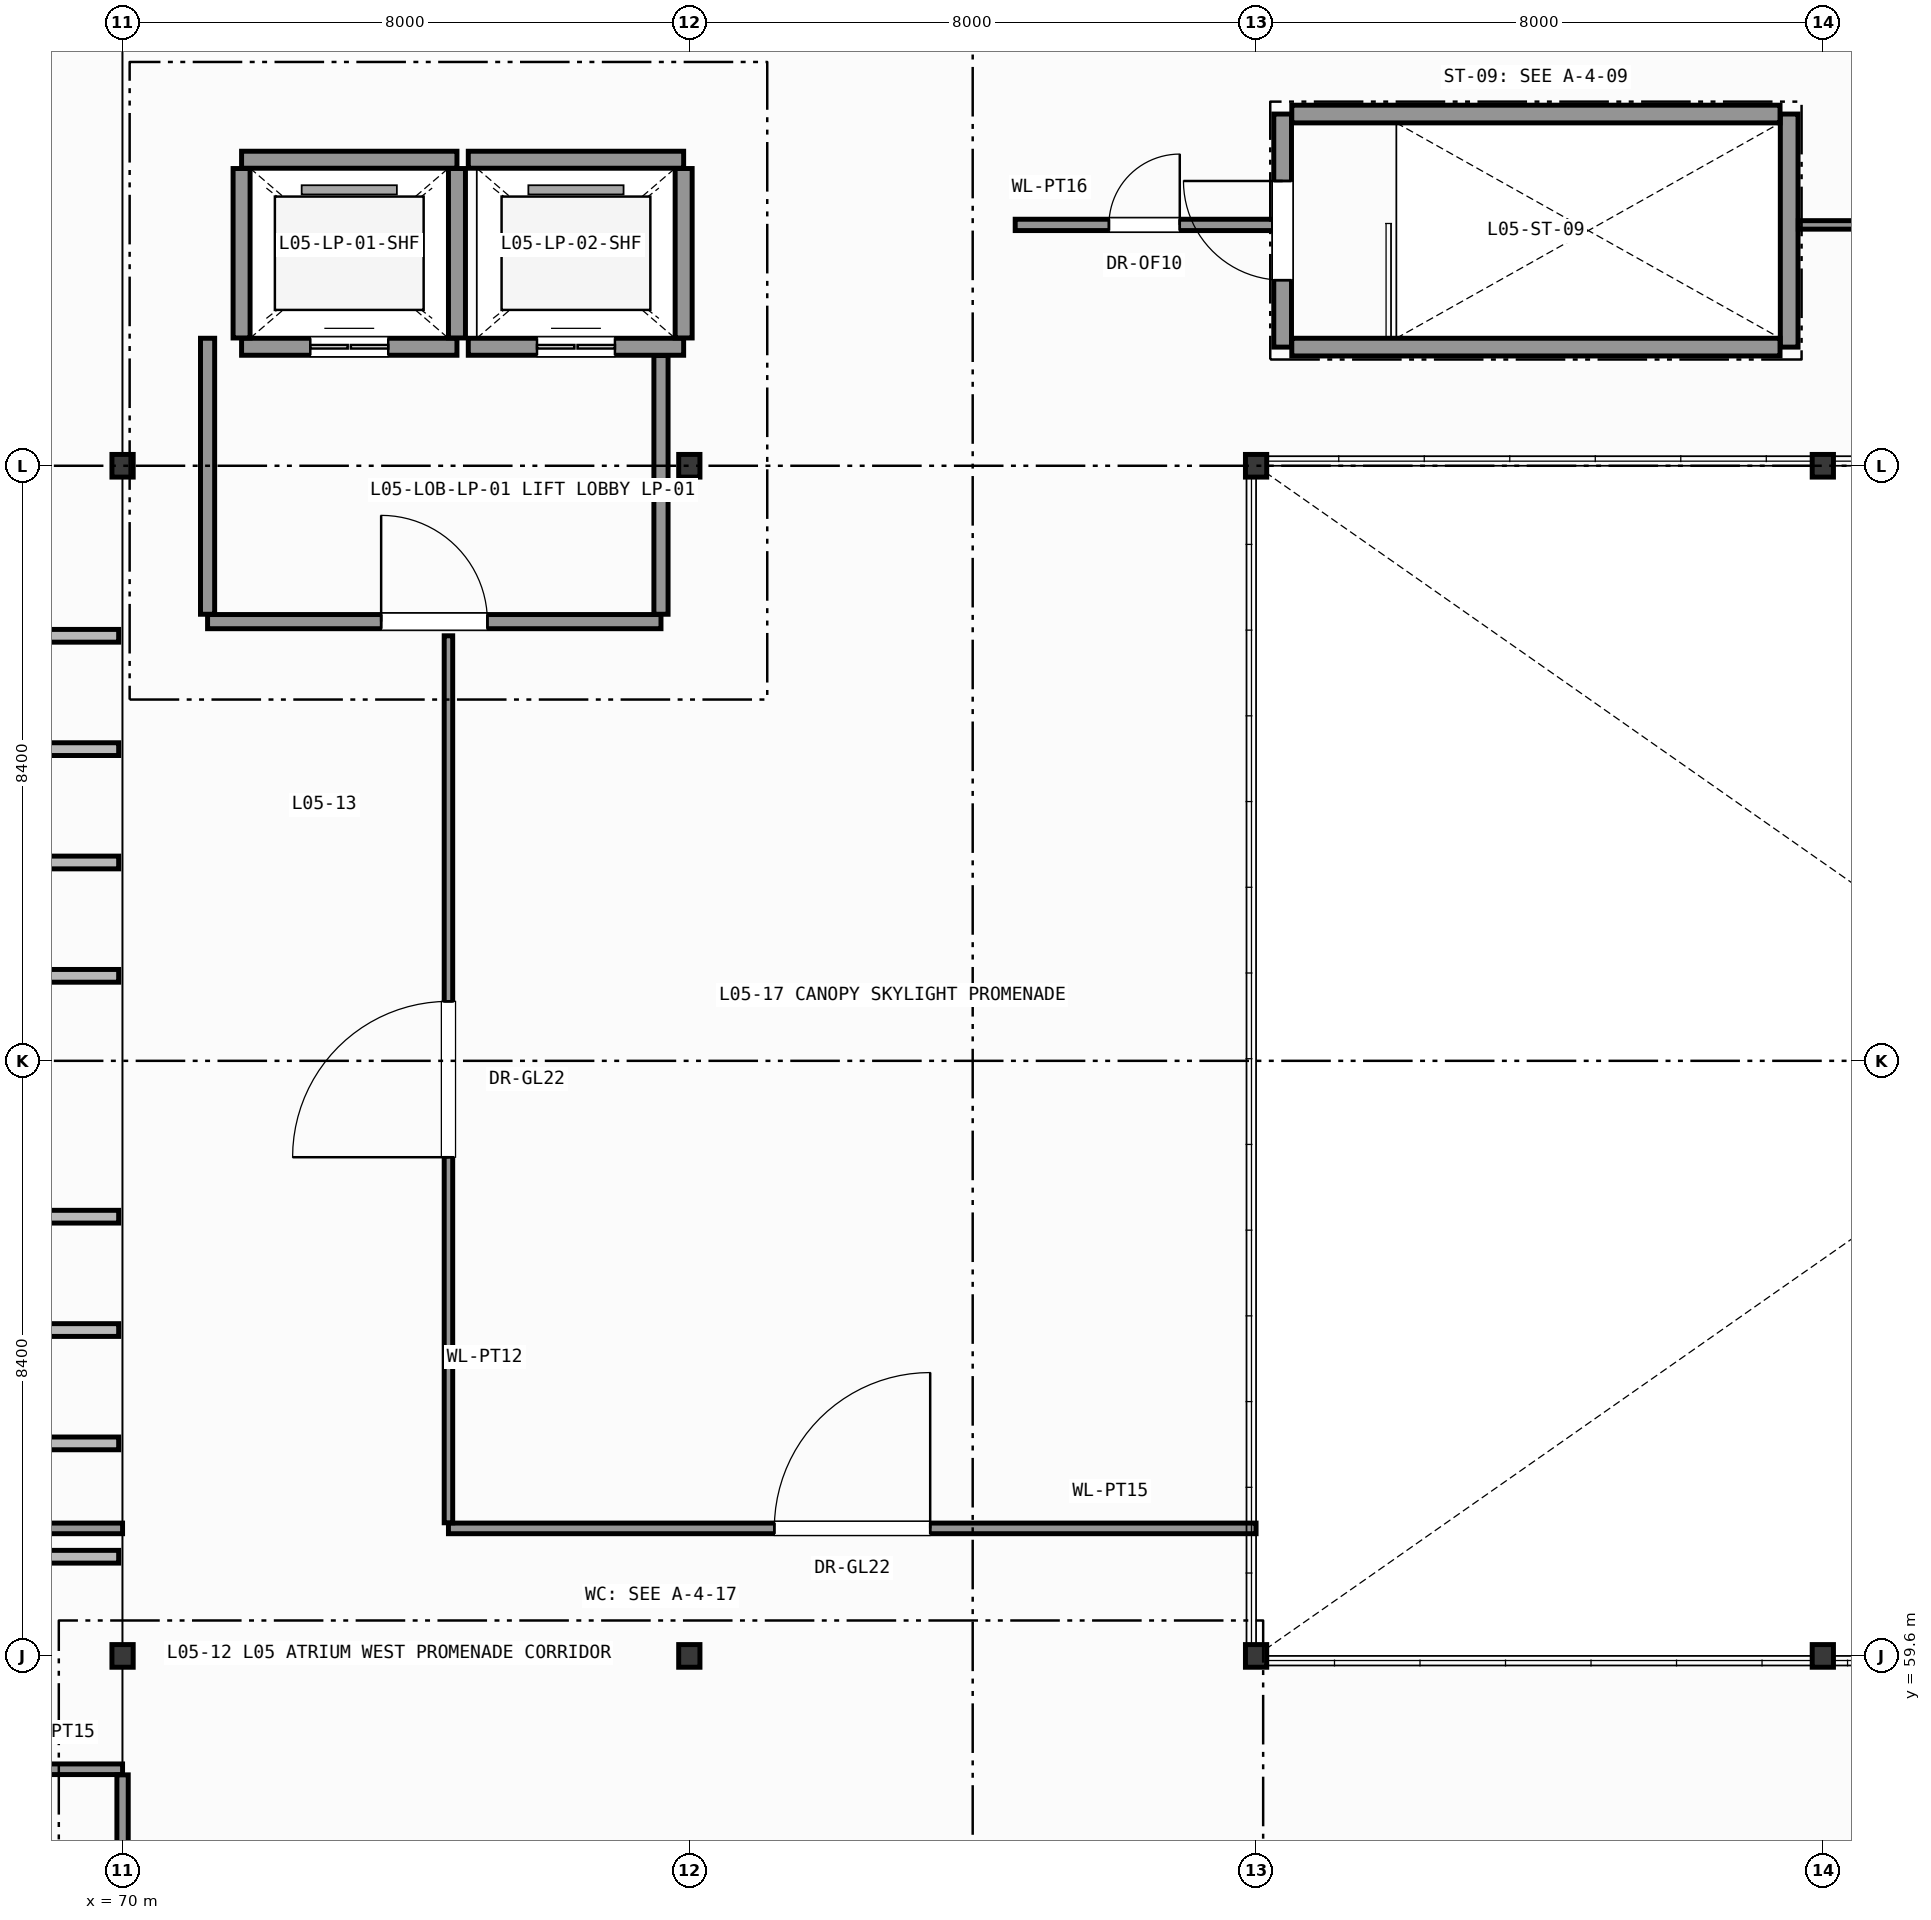
"""IFC4 building model, lengths in metres.
Left out: names, types, materials, properties, quantities, classifications, styles, units other than length and angle.
Written with IfcOpenShell. Run it as: python <this file> out.ifc"""

import sys

from ifc_helpers import new_model, si_unit, direction, frame, frame_2d, origin, origin_2d, place, context, subcontext, project, spatial, rectangle, i_section, extrude, element, fill, save


model = new_model("IFC4")
c1 = context("Model", 3, precision=1e-05, world=origin(), true_north=direction((0.0, 1.0)))
c2 = subcontext(c1, "Body", "Model", "MODEL_VIEW")
j1 = project(units=[si_unit("LENGTHUNIT", "METRE"), si_unit("PLANEANGLEUNIT", "RADIAN")], contexts=[c1])
p1 = place(None, origin())
s1 = spatial("IfcSite", under=j1, at=p1, CompositionType="ELEMENT")
p2 = place(p1, origin())
s2 = spatial("IfcBuilding", under=s1, at=p2, CompositionType="ELEMENT")
p3 = place(p2, frame((0.0, 0.0, 22.2)))
s3 = spatial("IfcBuildingStorey", under=s2, at=p3, CompositionType="ELEMENT", Elevation=22.2)
for number, where, z_axis, x_axis in (
    (1, (70.0, 59.6, 0.0), (0.0, 0.0, 1.0), (1.0, 0.0, 0.0)),
    (2, (70.0, 76.4, 0.0), (0.0, 0.0, 1.0), (1.0, 0.0, 0.0)),
    (3, (78.0, 59.6, 0.0), (0.0, 0.0, 1.0), (1.0, 0.0, 0.0)),
    (4, (78.0, 76.4, 0.0), (0.0, 0.0, 1.0), (1.0, 0.0, 0.0)),
    (5, (86.0, 59.6, 0.0), (0.0, 0.0, 1.0), (1.0, 0.0, 0.0)),
    (6, (86.0, 76.4, 0.0), (0.0, 0.0, 1.0), (1.0, 0.0, 0.0)),
    (7, (94.0, 59.6, 0.0), (0.0, 0.0, 1.0), (1.0, 0.0, 0.0)),
    (8, (94.0, 76.4, 0.0), (0.0, 0.0, 1.0), (1.0, 0.0, 0.0)),
):
    element("IfcColumn", number, at=place(p3, frame(where, z_axis=z_axis, x_axis=x_axis)), inside=s3, PredefinedType="COLUMN", context=c2, shape_type="SweptSolid", body=[
        extrude(i_section(OverallWidth=0.3, OverallDepth=0.32, WebThickness=0.011, FlangeThickness=0.021, FilletRadius=0.027, at=origin_2d()), origin(), (0.0, 0.0, 1.0), 4.2),
    ])
p4 = place(p3, frame((86.375, 78.075, 0.0), z_axis=(0.0, 0.0, 1.0), x_axis=(0.0, 1.0, 0.0)))
e9 = element("IfcWall", 9, at=p4, inside=s3, PredefinedType="SHEAR", context=c2, shape_type="SweptSolid", body=[
    extrude(rectangle(XDim=3.29, YDim=0.25, at=frame_2d((1.645, 0.0))), origin(), (0.0, 0.0, 1.0), 3.98),
])
p5 = place(p4, frame((0.945, 0.0, 0.0)))
e10 = element("IfcOpeningElement", 10, at=p5, cuts=e9, PredefinedType="OPENING", context=c2, shape_type="SweptSolid", body=[
    extrude(rectangle(XDim=1.4, YDim=2.2, at=frame_2d((0.7, 1.1))), frame((0.0, 0.135, 0.0), z_axis=(0.0, -1.0, 0.0), x_axis=(1.0, 0.0, 0.0)), (0.0, 0.0, 1.0), 0.27),
])
p6 = place(p3, frame((93.525, 78.075, 0.0), z_axis=(0.0, 0.0, 1.0), x_axis=(0.0, 1.0, 0.0)))
e11 = element("IfcWall", 11, at=p6, inside=s3, PredefinedType="SHEAR", context=c2, shape_type="SweptSolid", body=[
    extrude(rectangle(XDim=3.29, YDim=0.25, at=frame_2d((1.645, 0.0))), origin(), (0.0, 0.0, 1.0), 3.98),
])
for number, where, z_axis, x_axis in (
    (12, (86.504, 78.075, 0.0), (0.0, 0.0, 1.0), (1.0, 0.0, 0.0)),
    (13, (86.504, 81.365, 0.0), (0.0, 0.0, 1.0), (1.0, 0.0, 0.0)),
):
    element("IfcWall", number, at=place(p3, frame(where, z_axis=z_axis, x_axis=x_axis)), inside=s3, PredefinedType="SHEAR", context=c2, shape_type="SweptSolid", body=[
        extrude(rectangle(XDim=6.892, YDim=0.25, at=frame_2d((3.446, 0.0))), origin(), (0.0, 0.0, 1.0), 3.98),
    ])
p7 = place(p3, frame((71.68, 78.08, 0.0), z_axis=(0.0, 0.0, 1.0), x_axis=(1.0, 0.0, 0.0)))
e14 = element("IfcWall", 14, at=p7, inside=s3, PredefinedType="SHEAR", context=c2, shape_type="SweptSolid", body=[
    extrude(rectangle(XDim=3.04, YDim=0.24, at=frame_2d((1.52, 0.0))), origin(), (0.0, 0.0, 1.0), 3.98),
])
p8 = place(p7, frame((0.97, 0.0, 0.0)))
e15 = element("IfcOpeningElement", 15, at=p8, cuts=e14, PredefinedType="OPENING", context=c2, shape_type="SweptSolid", body=[
    extrude(rectangle(XDim=1.1, YDim=2.2, at=frame_2d((0.55, 1.1))), frame((0.0, 0.13, 0.0), z_axis=(0.0, -1.0, 0.0), x_axis=(1.0, 0.0, 0.0)), (0.0, 0.0, 1.0), 0.26),
])
p9 = place(p3, frame((71.68, 80.72, 0.0), z_axis=(0.0, 0.0, 1.0), x_axis=(1.0, 0.0, 0.0)))
e16 = element("IfcWall", 16, at=p9, inside=s3, PredefinedType="SHEAR", context=c2, shape_type="SweptSolid", body=[
    extrude(rectangle(XDim=3.04, YDim=0.24, at=frame_2d((1.52, 0.0))), origin(), (0.0, 0.0, 1.0), 3.98),
])
for number, where, z_axis, x_axis in (
    (17, (71.68, 78.204, 0.0), (0.0, 0.0, 1.0), (0.0, 1.0, 0.0)),
    (18, (74.72, 78.204, 0.0), (0.0, 0.0, 1.0), (0.0, 1.0, 0.0)),
):
    element("IfcWall", number, at=place(p3, frame(where, z_axis=z_axis, x_axis=x_axis)), inside=s3, PredefinedType="SHEAR", context=c2, shape_type="SweptSolid", body=[
        extrude(rectangle(XDim=2.392, YDim=0.24, at=frame_2d((1.196, 0.0))), origin(), (0.0, 0.0, 1.0), 3.98),
    ])
p10 = place(p3, frame((74.88, 78.08, 0.0), z_axis=(0.0, 0.0, 1.0), x_axis=(1.0, 0.0, 0.0)))
e19 = element("IfcWall", 19, at=p10, inside=s3, PredefinedType="SHEAR", context=c2, shape_type="SweptSolid", body=[
    extrude(rectangle(XDim=3.04, YDim=0.24, at=frame_2d((1.52, 0.0))), origin(), (0.0, 0.0, 1.0), 3.98),
])
p11 = place(p10, frame((0.97, 0.0, 0.0)))
e20 = element("IfcOpeningElement", 20, at=p11, cuts=e19, PredefinedType="OPENING", context=c2, shape_type="SweptSolid", body=[
    extrude(rectangle(XDim=1.1, YDim=2.2, at=frame_2d((0.55, 1.1))), frame((0.0, 0.13, 0.0), z_axis=(0.0, -1.0, 0.0), x_axis=(1.0, 0.0, 0.0)), (0.0, 0.0, 1.0), 0.26),
])
p12 = place(p3, frame((74.88, 80.72, 0.0), z_axis=(0.0, 0.0, 1.0), x_axis=(1.0, 0.0, 0.0)))
e21 = element("IfcWall", 21, at=p12, inside=s3, PredefinedType="SHEAR", context=c2, shape_type="SweptSolid", body=[
    extrude(rectangle(XDim=3.04, YDim=0.24, at=frame_2d((1.52, 0.0))), origin(), (0.0, 0.0, 1.0), 3.98),
])
p13 = place(p3, frame((77.92, 78.204, 0.0), z_axis=(0.0, 0.0, 1.0), x_axis=(0.0, 1.0, 0.0)))
e22 = element("IfcWall", 22, at=p13, inside=s3, PredefinedType="SHEAR", context=c2, shape_type="SweptSolid", body=[
    extrude(rectangle(XDim=2.392, YDim=0.24, at=frame_2d((1.196, 0.0))), origin(), (0.0, 0.0, 1.0), 3.98),
])
p14 = place(p3, frame((71.2, 74.2, 0.0), z_axis=(0.0, 0.0, 1.0), x_axis=(1.0, 0.0, 0.0)))
e23 = element("IfcWall", 23, at=p14, inside=s3, PredefinedType="PARTITIONING", context=c2, shape_type="SweptSolid", body=[
    extrude(rectangle(XDim=6.4, YDim=0.2, at=frame_2d((3.2, 0.0))), origin(), (0.0, 0.0, 1.0), 3.98),
])
p15 = place(p14, frame((2.45, 0.0, 0.0)))
e24 = element("IfcOpeningElement", 24, at=p15, cuts=e23, PredefinedType="OPENING", context=c2, shape_type="SweptSolid", body=[
    extrude(rectangle(XDim=1.5, YDim=2.2, at=frame_2d((0.75, 1.1))), frame((0.0, 0.11, 0.0), z_axis=(0.0, -1.0, 0.0), x_axis=(1.0, 0.0, 0.0)), (0.0, 0.0, 1.0), 0.22),
])
p16 = place(p3, frame((71.2, 74.304, 0.0), z_axis=(0.0, 0.0, 1.0), x_axis=(0.0, 1.0, 0.0)))
e25 = element("IfcWall", 25, at=p16, inside=s3, PredefinedType="PARTITIONING", context=c2, shape_type="SweptSolid", body=[
    extrude(rectangle(XDim=3.896, YDim=0.2, at=frame_2d((1.948, 0.0))), origin(), (0.0, 0.0, 1.0), 3.98),
])
p17 = place(p3, frame((77.6, 74.304, 0.0), z_axis=(0.0, 0.0, 1.0), x_axis=(0.0, 1.0, 0.0)))
e26 = element("IfcWall", 26, at=p17, inside=s3, PredefinedType="PARTITIONING", context=c2, shape_type="SweptSolid", body=[
    extrude(rectangle(XDim=3.652, YDim=0.2, at=frame_2d((1.826, 0.0))), origin(), (0.0, 0.0, 1.0), 3.98),
])
p18 = place(p3, frame((43.6, 61.4, 0.0), z_axis=(0.0, 0.0, 1.0), x_axis=(1.0, 0.0, 0.0)))
e27 = element("IfcWall", 27, at=p18, inside=s3, PredefinedType="PARTITIONING", context=c2, shape_type="SweptSolid", body=[
    extrude(rectangle(XDim=26.4, YDim=0.15, at=frame_2d((13.2, 0.0))), origin(), (0.0, 0.0, 1.0), 3.98),
])
p19 = place(p18, frame((12.1, 0.0, 0.0)))
e28 = element("IfcOpeningElement", 28, at=p19, cuts=e27, PredefinedType="OPENING", context=c2, shape_type="SweptSolid", body=[
    extrude(rectangle(XDim=2.2, YDim=2.6, at=frame_2d((1.1, 1.3))), frame((0.0, 0.085, 0.0), z_axis=(0.0, -1.0, 0.0), x_axis=(1.0, 0.0, 0.0)), (0.0, 0.0, 1.0), 0.17),
])
p20 = place(p3, frame((64.6, 58.0, 0.0), z_axis=(0.0, 0.0, 1.0), x_axis=(1.0, 0.0, 0.0)))
e29 = element("IfcWall", 29, at=p20, inside=s3, PredefinedType="PARTITIONING", context=c2, shape_type="SweptSolid", body=[
    extrude(rectangle(XDim=5.4, YDim=0.15, at=frame_2d((2.7, 0.0))), origin(), (0.0, 0.0, 1.0), 3.98),
])
p21 = place(p20, frame((2.225, 0.0, 0.0)))
e30 = element("IfcOpeningElement", 30, at=p21, cuts=e29, PredefinedType="OPENING", context=c2, shape_type="SweptSolid", body=[
    extrude(rectangle(XDim=0.95, YDim=2.1, at=frame_2d((0.475, 1.05))), frame((0.0, 0.085, 0.0), z_axis=(0.0, -1.0, 0.0), x_axis=(1.0, 0.0, 0.0)), (0.0, 0.0, 1.0), 0.17),
])
p22 = place(p3, frame((70.0, 52.754, 0.0), z_axis=(0.0, 0.0, 1.0), x_axis=(0.0, 1.0, 0.0)))
e31 = element("IfcWall", 31, at=p22, inside=s3, PredefinedType="PARTITIONING", context=c2, shape_type="SweptSolid", body=[
    extrude(rectangle(XDim=5.167, YDim=0.16, at=frame_2d((2.583, 0.0))), origin(), (0.0, 0.0, 1.0), 3.98),
])
p23 = place(p22, frame((2.083, 0.0, 0.0)))
e32 = element("IfcOpeningElement", 32, at=p23, cuts=e31, PredefinedType="OPENING", context=c2, shape_type="SweptSolid", body=[
    extrude(rectangle(XDim=1.0, YDim=2.15, at=frame_2d((0.5, 1.075))), frame((0.0, 0.09, 0.0), z_axis=(0.0, -1.0, 0.0), x_axis=(1.0, 0.0, 0.0)), (0.0, 0.0, 1.0), 0.18),
])
p24 = place(p3, frame((74.6, 61.4, 0.0), z_axis=(0.0, 0.0, 1.0), x_axis=(1.0, 0.0, 0.0)))
e33 = element("IfcWall", 33, at=p24, inside=s3, PredefinedType="PARTITIONING", context=c2, shape_type="SweptSolid", body=[
    extrude(rectangle(XDim=11.4, YDim=0.15, at=frame_2d((5.7, 0.0))), origin(), (0.0, 0.0, 1.0), 3.98),
])
p25 = place(p24, frame((4.6, 0.0, 0.0)))
e34 = element("IfcOpeningElement", 34, at=p25, cuts=e33, PredefinedType="OPENING", context=c2, shape_type="SweptSolid", body=[
    extrude(rectangle(XDim=2.2, YDim=2.6, at=frame_2d((1.1, 1.3))), frame((0.0, 0.085, 0.0), z_axis=(0.0, -1.0, 0.0), x_axis=(1.0, 0.0, 0.0)), (0.0, 0.0, 1.0), 0.17),
])
p26 = place(p3, frame((74.6, 61.479, 0.0), z_axis=(0.0, 0.0, 1.0), x_axis=(0.0, 1.0, 0.0)))
e35 = element("IfcWall", 35, at=p26, inside=s3, PredefinedType="PARTITIONING", context=c2, shape_type="SweptSolid", body=[
    extrude(rectangle(XDim=12.521, YDim=0.12, at=frame_2d((6.26, 0.0))), origin(), (0.0, 0.0, 1.0), 3.98),
])
p27 = place(p26, frame((5.16, 0.0, 0.0)))
e36 = element("IfcOpeningElement", 36, at=p27, cuts=e35, PredefinedType="OPENING", context=c2, shape_type="SweptSolid", body=[
    extrude(rectangle(XDim=2.2, YDim=2.6, at=frame_2d((1.1, 1.3))), frame((0.0, 0.07, 0.0), z_axis=(0.0, -1.0, 0.0), x_axis=(1.0, 0.0, 0.0)), (0.0, 0.0, 1.0), 0.14),
])
p28 = place(p3, frame((93.654, 79.8, 0.0), z_axis=(0.0, 0.0, 1.0), x_axis=(1.0, 0.0, 0.0)))
e37 = element("IfcWall", 37, at=p28, inside=s3, PredefinedType="PARTITIONING", context=c2, shape_type="SweptSolid", body=[
    extrude(rectangle(XDim=19.746, YDim=0.12, at=frame_2d((9.873, 0.0))), origin(), (0.0, 0.0, 1.0), 3.98),
])
p29 = place(p28, frame((8.773, 0.0, 0.0)))
e38 = element("IfcOpeningElement", 38, at=p29, cuts=e37, PredefinedType="OPENING", context=c2, shape_type="SweptSolid", body=[
    extrude(rectangle(XDim=2.2, YDim=2.6, at=frame_2d((1.1, 1.3))), frame((0.0, 0.07, 0.0), z_axis=(0.0, -1.0, 0.0), x_axis=(1.0, 0.0, 0.0)), (0.0, 0.0, 1.0), 0.14),
])
p30 = place(p3, frame((82.6, 79.8, 0.0), z_axis=(0.0, 0.0, 1.0), x_axis=(1.0, 0.0, 0.0)))
e39 = element("IfcWall", 39, at=p30, inside=s3, PredefinedType="PARTITIONING", context=c2, shape_type="SweptSolid", body=[
    extrude(rectangle(XDim=3.646, YDim=0.16, at=frame_2d((1.823, 0.0))), origin(), (0.0, 0.0, 1.0), 3.98),
])
p31 = place(p30, frame((1.323, 0.0, 0.0)))
e40 = element("IfcOpeningElement", 40, at=p31, cuts=e39, PredefinedType="OPENING", context=c2, shape_type="SweptSolid", body=[
    extrude(rectangle(XDim=1.0, YDim=2.15, at=frame_2d((0.5, 1.075))), frame((0.0, 0.09, 0.0), z_axis=(0.0, -1.0, 0.0), x_axis=(1.0, 0.0, 0.0)), (0.0, 0.0, 1.0), 0.18),
])
p32 = place(p5, origin())
e41 = element("IfcDoor", 41, at=p32, inside=s3, OperationType="SINGLE_SWING_RIGHT", PredefinedType="DOOR", context=c2, shape_type="SweptSolid", body=[
    extrude(rectangle(XDim=1.4, YDim=2.2, at=frame_2d((0.7, 1.1))), frame((0.0, 0.025, 0.0), z_axis=(0.0, -1.0, 0.0), x_axis=(1.0, 0.0, 0.0)), (0.0, 0.0, 1.0), 0.05),
])
fill(e10, e41)
p33 = place(p8, origin())
e42 = element("IfcDoor", 42, at=p33, inside=s3, OperationType="DOUBLE_DOOR_SLIDING", PredefinedType="DOOR", context=c2, shape_type="SweptSolid", body=[
    extrude(rectangle(XDim=1.1, YDim=2.2, at=frame_2d((0.55, 1.1))), frame((0.0, 0.025, 0.0), z_axis=(0.0, -1.0, 0.0), x_axis=(1.0, 0.0, 0.0)), (0.0, 0.0, 1.0), 0.05),
])
fill(e15, e42)
p34 = place(p11, origin())
e43 = element("IfcDoor", 43, at=p34, inside=s3, OperationType="DOUBLE_DOOR_SLIDING", PredefinedType="DOOR", context=c2, shape_type="SweptSolid", body=[
    extrude(rectangle(XDim=1.1, YDim=2.2, at=frame_2d((0.55, 1.1))), frame((0.0, 0.025, 0.0), z_axis=(0.0, -1.0, 0.0), x_axis=(1.0, 0.0, 0.0)), (0.0, 0.0, 1.0), 0.05),
])
fill(e20, e43)
p35 = place(p15, origin())
e44 = element("IfcDoor", 44, at=p35, inside=s3, OperationType="SINGLE_SWING_LEFT", PredefinedType="DOOR", context=c2, shape_type="SweptSolid", body=[
    extrude(rectangle(XDim=1.5, YDim=2.2, at=frame_2d((0.75, 1.1))), frame((0.0, 0.025, 0.0), z_axis=(0.0, -1.0, 0.0), x_axis=(1.0, 0.0, 0.0)), (0.0, 0.0, 1.0), 0.05),
])
fill(e24, e44)
p36 = place(p25, origin())
e45 = element("IfcDoor", 45, at=p36, inside=s3, OperationType="SINGLE_SWING_RIGHT", PredefinedType="DOOR", context=c2, shape_type="SweptSolid", body=[
    extrude(rectangle(XDim=2.2, YDim=2.6, at=frame_2d((1.1, 1.3))), frame((0.0, 0.025, 0.0), z_axis=(0.0, -1.0, 0.0), x_axis=(1.0, 0.0, 0.0)), (0.0, 0.0, 1.0), 0.05),
])
fill(e34, e45)
p37 = place(p27, origin())
e46 = element("IfcDoor", 46, at=p37, inside=s3, OperationType="SINGLE_SWING_LEFT", PredefinedType="DOOR", context=c2, shape_type="SweptSolid", body=[
    extrude(rectangle(XDim=2.2, YDim=2.6, at=frame_2d((1.1, 1.3))), frame((0.0, 0.025, 0.0), z_axis=(0.0, -1.0, 0.0), x_axis=(1.0, 0.0, 0.0)), (0.0, 0.0, 1.0), 0.05),
])
fill(e36, e46)
p38 = place(p31, origin())
e47 = element("IfcDoor", 47, at=p38, inside=s3, OperationType="SINGLE_SWING_RIGHT", PredefinedType="DOOR", context=c2, shape_type="SweptSolid", body=[
    extrude(rectangle(XDim=1.0, YDim=2.15, at=frame_2d((0.5, 1.075))), frame((0.0, 0.025, 0.0), z_axis=(0.0, -1.0, 0.0), x_axis=(1.0, 0.0, 0.0)), (0.0, 0.0, 1.0), 0.05),
])
fill(e40, e47)
save(model, sys.argv[1])
